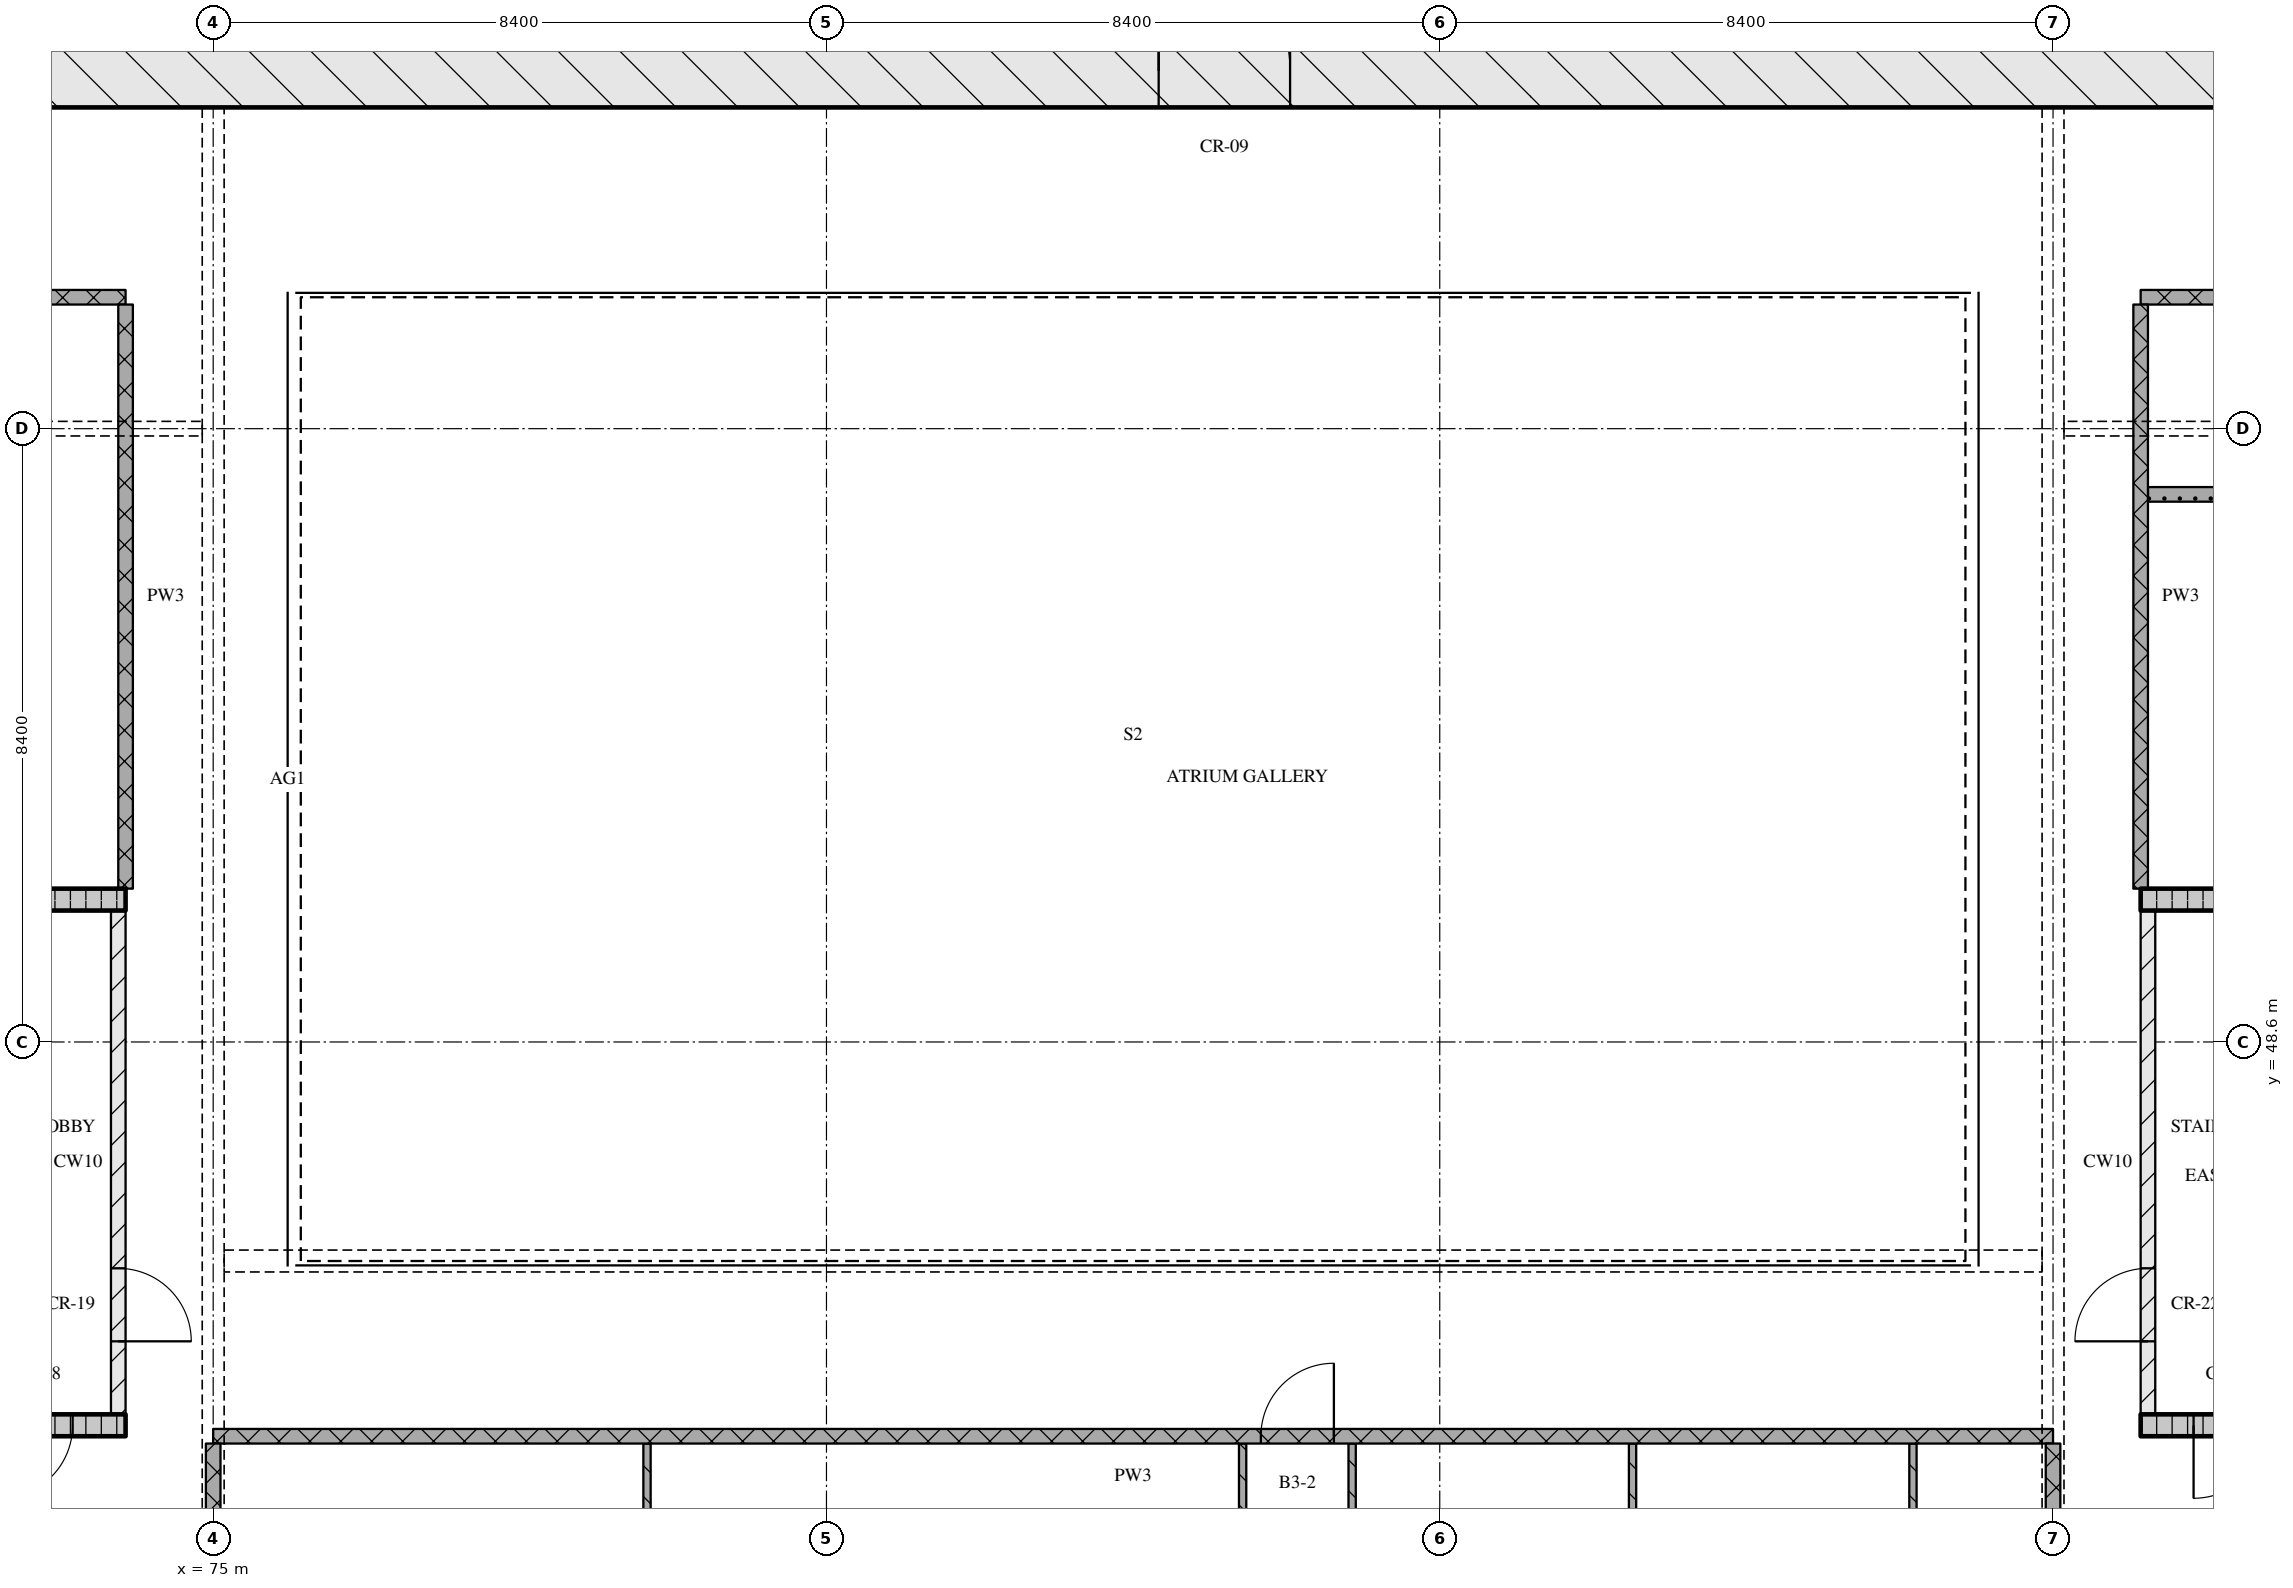
"""IFC4 building model, lengths in metres.
Left out: names, types, materials, properties, quantities, classifications, styles, units other than length and angle.
Written with IfcOpenShell. Run it as: python <this file> out.ifc"""

import sys

from ifc_helpers import new_model, si_unit, direction, frame, frame_2d, origin, place, context, subcontext, project, spatial, rectangle, extrude, element, fill, save


model = new_model("IFC4")
c1 = context("Model", 3, precision=1e-05, world=origin(), true_north=direction((0.0, 1.0)))
c2 = subcontext(c1, "Body", "Model", "MODEL_VIEW")
j1 = project(units=[si_unit("LENGTHUNIT", "METRE"), si_unit("PLANEANGLEUNIT", "RADIAN")], contexts=[c1])
p1 = place(None, origin())
s1 = spatial("IfcSite", under=j1, at=p1, CompositionType="ELEMENT")
p2 = place(p1, origin())
s2 = spatial("IfcBuilding", under=s1, at=p2, CompositionType="ELEMENT")
p3 = place(p2, frame((0.0, 0.0, 124.05)))
s3 = spatial("IfcBuildingStorey", under=s2, at=p3, CompositionType="ELEMENT", Elevation=124.05)
p4 = place(p3, frame((66.8, 61.9, 0.0), z_axis=(0.0, 0.0, 1.0), x_axis=(1.0, 0.0, 0.0)))
e1 = element("IfcWall", 1, at=p4, inside=s3, PredefinedType="SOLIDWALL", context=c2, shape_type="SweptSolid", body=[
    extrude(rectangle(XDim=41.6, YDim=1.0, at=frame_2d((20.8, 0.0))), origin(), (0.0, 0.0, 1.0), 3.32),
])
p5 = place(p4, frame((21.15, 0.0, 0.0)))
e2 = element("IfcOpeningElement", 2, at=p5, cuts=e1, PredefinedType="OPENING", context=c2, shape_type="SweptSolid", body=[
    extrude(rectangle(XDim=1.8, YDim=2.1, at=frame_2d((0.9, 1.05))), frame((0.0, 0.51, 0.0), z_axis=(0.0, -1.0, 0.0), x_axis=(1.0, 0.0, 0.0)), (0.0, 0.0, 1.0), 1.02),
])
p6 = place(p3, frame((68.2, 43.35, 0.0), z_axis=(0.0, 0.0, 1.0), x_axis=(1.0, 0.0, 0.0)))
e3 = element("IfcWall", 3, at=p6, inside=s3, PredefinedType="SOLIDWALL", context=c2, shape_type="SweptSolid", body=[
    extrude(rectangle(XDim=5.6, YDim=0.3, at=frame_2d((2.8, 0.0))), origin(), (0.0, 0.0, 1.0), 3.32),
])
p7 = place(p6, frame((3.875, 0.0, 0.0)))
e4 = element("IfcOpeningElement", 4, at=p7, cuts=e3, PredefinedType="OPENING", context=c2, shape_type="SweptSolid", body=[
    extrude(rectangle(XDim=1.0, YDim=2.1, at=frame_2d((0.5, 1.05))), frame((0.0, 0.16, 0.0), z_axis=(0.0, -1.0, 0.0), x_axis=(1.0, 0.0, 0.0)), (0.0, 0.0, 1.0), 0.32),
])
p8 = place(p3, frame((73.7, 43.5, 0.0), z_axis=(0.0, 0.0, 1.0), x_axis=(0.0, 1.0, 0.0)))
e5 = element("IfcWall", 5, at=p8, inside=s3, PredefinedType="PARTITIONING", context=c2, shape_type="SweptSolid", body=[
    extrude(rectangle(XDim=6.9, YDim=0.2, at=frame_2d((3.45, 0.0))), origin(), (0.0, 0.0, 1.0), 3.32),
])
p9 = place(p8, frame((1.0, 0.0, 0.0)))
e6 = element("IfcOpeningElement", 6, at=p9, cuts=e5, PredefinedType="OPENING", context=c2, shape_type="SweptSolid", body=[
    extrude(rectangle(XDim=1.0, YDim=2.1, at=frame_2d((0.5, 1.05))), frame((0.0, 0.11, 0.0), z_axis=(0.0, -1.0, 0.0), x_axis=(1.0, 0.0, 0.0)), (0.0, 0.0, 1.0), 0.22),
])
p10 = place(p3, frame((68.2, 50.55, 0.0), z_axis=(0.0, 0.0, 1.0), x_axis=(1.0, 0.0, 0.0)))
e7 = element("IfcWall", 7, at=p10, inside=s3, PredefinedType="SOLIDWALL", context=c2, shape_type="SweptSolid", body=[
    extrude(rectangle(XDim=5.6, YDim=0.3, at=frame_2d((2.8, 0.0))), origin(), (0.0, 0.0, 1.0), 3.32),
])
p11 = place(p3, frame((101.4, 43.35, 0.0), z_axis=(0.0, 0.0, 1.0), x_axis=(1.0, 0.0, 0.0)))
e8 = element("IfcWall", 8, at=p11, inside=s3, PredefinedType="SOLIDWALL", context=c2, shape_type="SweptSolid", body=[
    extrude(rectangle(XDim=5.6, YDim=0.3, at=frame_2d((2.8, 0.0))), origin(), (0.0, 0.0, 1.0), 3.32),
])
p12 = place(p11, frame((0.725, 0.0, 0.0)))
e9 = element("IfcOpeningElement", 9, at=p12, cuts=e8, PredefinedType="OPENING", context=c2, shape_type="SweptSolid", body=[
    extrude(rectangle(XDim=1.0, YDim=2.1, at=frame_2d((0.5, 1.05))), frame((0.0, 0.16, 0.0), z_axis=(0.0, -1.0, 0.0), x_axis=(1.0, 0.0, 0.0)), (0.0, 0.0, 1.0), 0.32),
])
p13 = place(p3, frame((101.5, 43.5, 0.0), z_axis=(0.0, 0.0, 1.0), x_axis=(0.0, 1.0, 0.0)))
e10 = element("IfcWall", 10, at=p13, inside=s3, PredefinedType="PARTITIONING", context=c2, shape_type="SweptSolid", body=[
    extrude(rectangle(XDim=6.9, YDim=0.2, at=frame_2d((3.45, 0.0))), origin(), (0.0, 0.0, 1.0), 3.32),
])
p14 = place(p13, frame((1.0, 0.0, 0.0)))
e11 = element("IfcOpeningElement", 11, at=p14, cuts=e10, PredefinedType="OPENING", context=c2, shape_type="SweptSolid", body=[
    extrude(rectangle(XDim=1.0, YDim=2.1, at=frame_2d((0.5, 1.05))), frame((0.0, 0.11, 0.0), z_axis=(0.0, -1.0, 0.0), x_axis=(1.0, 0.0, 0.0)), (0.0, 0.0, 1.0), 0.22),
])
p15 = place(p3, frame((101.4, 50.55, 0.0), z_axis=(0.0, 0.0, 1.0), x_axis=(1.0, 0.0, 0.0)))
e12 = element("IfcWall", 12, at=p15, inside=s3, PredefinedType="SOLIDWALL", context=c2, shape_type="SweptSolid", body=[
    extrude(rectangle(XDim=5.6, YDim=0.3, at=frame_2d((2.8, 0.0))), origin(), (0.0, 0.0, 1.0), 3.32),
])
p16 = place(p3, frame((100.2, 43.2, 0.0), z_axis=(0.0, 0.0, 1.0), x_axis=(-1.0, 0.0, 0.0)))
e13 = element("IfcWall", 13, at=p16, inside=s3, PredefinedType="PARTITIONING", context=c2, shape_type="SweptSolid", body=[
    extrude(rectangle(XDim=25.2, YDim=0.2, at=frame_2d((12.6, 0.0))), origin(), (0.0, 0.0, 1.0), 3.32),
])
p17 = place(p16, frame((9.85, 0.0, 0.0)))
e14 = element("IfcOpeningElement", 14, at=p17, cuts=e13, PredefinedType="OPENING", context=c2, shape_type="SweptSolid", body=[
    extrude(rectangle(XDim=1.0, YDim=2.1, at=frame_2d((0.5, 1.05))), frame((0.0, 0.11, 0.0), z_axis=(0.0, -1.0, 0.0), x_axis=(1.0, 0.0, 0.0)), (0.0, 0.0, 1.0), 0.22),
])
p18 = place(p3, frame((101.5, 56.1, 0.0), z_axis=(0.0, 0.0, 1.0), x_axis=(1.0, 0.0, 0.0)))
e15 = element("IfcWall", 15, at=p18, inside=s3, PredefinedType="PARTITIONING", context=c2, shape_type="SweptSolid", body=[
    extrude(rectangle(XDim=7.0, YDim=0.2, at=frame_2d((3.5, 0.0))), origin(), (0.0, 0.0, 1.0), 3.32),
])
p19 = place(p3, frame((73.8, 58.8, 0.0), z_axis=(0.0, 0.0, 1.0), x_axis=(-1.0, 0.0, 0.0)))
e16 = element("IfcWall", 16, at=p19, inside=s3, PredefinedType="PARTITIONING", context=c2, shape_type="SweptSolid", body=[
    extrude(rectangle(XDim=7.2, YDim=0.2, at=frame_2d((3.6, 0.0))), origin(), (0.0, 0.0, 1.0), 3.32),
])
p20 = place(p19, frame((3.0, 0.0, 0.0)))
e17 = element("IfcOpeningElement", 17, at=p20, cuts=e16, PredefinedType="OPENING", context=c2, shape_type="SweptSolid", body=[
    extrude(rectangle(XDim=1.2, YDim=2.1, at=frame_2d((0.6, 1.05))), frame((0.0, 0.11, 0.0), z_axis=(0.0, -1.0, 0.0), x_axis=(1.0, 0.0, 0.0)), (0.0, 0.0, 1.0), 0.22),
])
p21 = place(p3, frame((101.4, 58.8, 0.0), z_axis=(0.0, 0.0, 1.0), x_axis=(1.0, 0.0, 0.0)))
e18 = element("IfcWall", 18, at=p21, inside=s3, PredefinedType="PARTITIONING", context=c2, shape_type="SweptSolid", body=[
    extrude(rectangle(XDim=7.2, YDim=0.2, at=frame_2d((3.6, 0.0))), origin(), (0.0, 0.0, 1.0), 3.32),
])
p22 = place(p3, frame((73.8, 58.7, 0.0), z_axis=(0.0, 0.0, 1.0), x_axis=(0.0, -1.0, 0.0)))
e19 = element("IfcWall", 19, at=p22, inside=s3, PredefinedType="PARTITIONING", context=c2, shape_type="SweptSolid", body=[
    extrude(rectangle(XDim=8.0, YDim=0.2, at=frame_2d((4.0, 0.0))), origin(), (0.0, 0.0, 1.0), 3.32),
])
p23 = place(p3, frame((75.0, 43.1, 0.0), z_axis=(0.0, 0.0, 1.0), x_axis=(0.0, -1.0, 0.0)))
e20 = element("IfcWall", 20, at=p23, inside=s3, PredefinedType="PARTITIONING", context=c2, shape_type="SweptSolid", body=[
    extrude(rectangle(XDim=2.2, YDim=0.2, at=frame_2d((1.1, 0.0))), origin(), (0.0, 0.0, 1.0), 2.43),
])
p24 = place(p3, frame((80.942, 43.1, 0.0), z_axis=(0.0, 0.0, 1.0), x_axis=(0.0, -1.0, 0.0)))
e21 = element("IfcWall", 21, at=p24, inside=s3, PredefinedType="PARTITIONING", context=c2, shape_type="SweptSolid", body=[
    extrude(rectangle(XDim=6.75, YDim=0.1, at=frame_2d((3.375, 0.0))), origin(), (0.0, 0.0, 1.0), 3.32),
])
p25 = place(p3, frame((89.1, 36.35, 0.0), z_axis=(0.0, 0.0, 1.0), x_axis=(0.0, 1.0, 0.0)))
e22 = element("IfcWall", 22, at=p25, inside=s3, PredefinedType="PARTITIONING", context=c2, shape_type="SweptSolid", body=[
    extrude(rectangle(XDim=6.75, YDim=0.1, at=frame_2d((3.375, 0.0))), origin(), (0.0, 0.0, 1.0), 3.32),
])
p26 = place(p25, frame((2.95, 0.0, 0.0)))
e23 = element("IfcOpeningElement", 23, at=p26, cuts=e22, PredefinedType="OPENING", context=c2, shape_type="SweptSolid", body=[
    extrude(rectangle(XDim=0.9, YDim=2.1, at=frame_2d((0.45, 1.05))), frame((0.0, 0.06, 0.0), z_axis=(0.0, -1.0, 0.0), x_axis=(1.0, 0.0, 0.0)), (0.0, 0.0, 1.0), 0.12),
])
p27 = place(p3, frame((90.6, 43.1, 0.0), z_axis=(0.0, 0.0, 1.0), x_axis=(0.0, -1.0, 0.0)))
e24 = element("IfcWall", 24, at=p27, inside=s3, PredefinedType="PARTITIONING", context=c2, shape_type="SweptSolid", body=[
    extrude(rectangle(XDim=6.75, YDim=0.1, at=frame_2d((3.375, 0.0))), origin(), (0.0, 0.0, 1.0), 3.32),
])
p28 = place(p27, frame((3.4, 0.0, 0.0)))
e25 = element("IfcOpeningElement", 25, at=p28, cuts=e24, PredefinedType="OPENING", context=c2, shape_type="SweptSolid", body=[
    extrude(rectangle(XDim=0.8, YDim=2.1, at=frame_2d((0.4, 1.05))), frame((0.0, 0.06, 0.0), z_axis=(0.0, -1.0, 0.0), x_axis=(1.0, 0.0, 0.0)), (0.0, 0.0, 1.0), 0.12),
])
for number, where, z_axis, x_axis in (
    (26, (94.441, 43.1, 0.0), (0.0, 0.0, 1.0), (0.0, -1.0, 0.0)),
    (27, (98.281, 43.1, 0.0), (0.0, 0.0, 1.0), (0.0, -1.0, 0.0)),
):
    element("IfcWall", number, at=place(p3, frame(where, z_axis=z_axis, x_axis=x_axis)), inside=s3, PredefinedType="PARTITIONING", context=c2, shape_type="SweptSolid", body=[
        extrude(rectangle(XDim=6.75, YDim=0.1, at=frame_2d((3.375, 0.0))), origin(), (0.0, 0.0, 1.0), 3.32),
    ])
p29 = place(p3, frame((100.2, 43.1, 0.0), z_axis=(0.0, 0.0, 1.0), x_axis=(0.0, -1.0, 0.0)))
e28 = element("IfcWall", 28, at=p29, inside=s3, PredefinedType="PARTITIONING", context=c2, shape_type="SweptSolid", body=[
    extrude(rectangle(XDim=2.2, YDim=0.2, at=frame_2d((1.1, 0.0))), origin(), (0.0, 0.0, 1.0), 2.43),
])
p30 = place(p3, frame((101.4, 58.7, 0.0), z_axis=(0.0, 0.0, 1.0), x_axis=(0.0, -1.0, 0.0)))
e29 = element("IfcWall", 29, at=p30, inside=s3, PredefinedType="PARTITIONING", context=c2, shape_type="SweptSolid", body=[
    extrude(rectangle(XDim=8.0, YDim=0.2, at=frame_2d((4.0, 0.0))), origin(), (0.0, 0.0, 1.0), 3.32),
])
p31 = place(p5, origin())
e30 = element("IfcDoor", 30, at=p31, inside=s3, OperationType="DOUBLE_DOOR_SINGLE_SWING", PredefinedType="DOOR", context=c2, shape_type="SweptSolid", body=[
    extrude(rectangle(XDim=1.8, YDim=2.1, at=frame_2d((0.9, 1.05))), frame((0.0, 0.025, 0.0), z_axis=(0.0, -1.0, 0.0), x_axis=(1.0, 0.0, 0.0)), (0.0, 0.0, 1.0), 0.05),
])
fill(e2, e30)
p32 = place(p7, origin())
e31 = element("IfcDoor", 31, at=p32, inside=s3, OperationType="SINGLE_SWING_RIGHT", PredefinedType="DOOR", context=c2, shape_type="SweptSolid", body=[
    extrude(rectangle(XDim=1.0, YDim=2.1, at=frame_2d((0.5, 1.05))), frame((0.0, 0.025, 0.0), z_axis=(0.0, -1.0, 0.0), x_axis=(1.0, 0.0, 0.0)), (0.0, 0.0, 1.0), 0.05),
])
fill(e4, e31)
p33 = place(p9, origin())
e32 = element("IfcDoor", 32, at=p33, inside=s3, OperationType="SINGLE_SWING_RIGHT", PredefinedType="DOOR", context=c2, shape_type="SweptSolid", body=[
    extrude(rectangle(XDim=1.0, YDim=2.1, at=frame_2d((0.5, 1.05))), frame((0.0, 0.025, 0.0), z_axis=(0.0, -1.0, 0.0), x_axis=(1.0, 0.0, 0.0)), (0.0, 0.0, 1.0), 0.05),
])
fill(e6, e32)
p34 = place(p12, origin())
e33 = element("IfcDoor", 33, at=p34, inside=s3, OperationType="SINGLE_SWING_RIGHT", PredefinedType="DOOR", context=c2, shape_type="SweptSolid", body=[
    extrude(rectangle(XDim=1.0, YDim=2.1, at=frame_2d((0.5, 1.05))), frame((0.0, 0.025, 0.0), z_axis=(0.0, -1.0, 0.0), x_axis=(1.0, 0.0, 0.0)), (0.0, 0.0, 1.0), 0.05),
])
fill(e9, e33)
p35 = place(p14, origin())
e34 = element("IfcDoor", 34, at=p35, inside=s3, OperationType="SINGLE_SWING_LEFT", PredefinedType="DOOR", context=c2, shape_type="SweptSolid", body=[
    extrude(rectangle(XDim=1.0, YDim=2.1, at=frame_2d((0.5, 1.05))), frame((0.0, 0.025, 0.0), z_axis=(0.0, -1.0, 0.0), x_axis=(1.0, 0.0, 0.0)), (0.0, 0.0, 1.0), 0.05),
])
fill(e11, e34)
p36 = place(p17, origin())
e35 = element("IfcDoor", 35, at=p36, inside=s3, OperationType="SINGLE_SWING_RIGHT", PredefinedType="DOOR", context=c2, shape_type="SweptSolid", body=[
    extrude(rectangle(XDim=1.0, YDim=2.1, at=frame_2d((0.5, 1.05))), frame((0.0, 0.025, 0.0), z_axis=(0.0, -1.0, 0.0), x_axis=(1.0, 0.0, 0.0)), (0.0, 0.0, 1.0), 0.05),
])
fill(e14, e35)
save(model, sys.argv[1])
